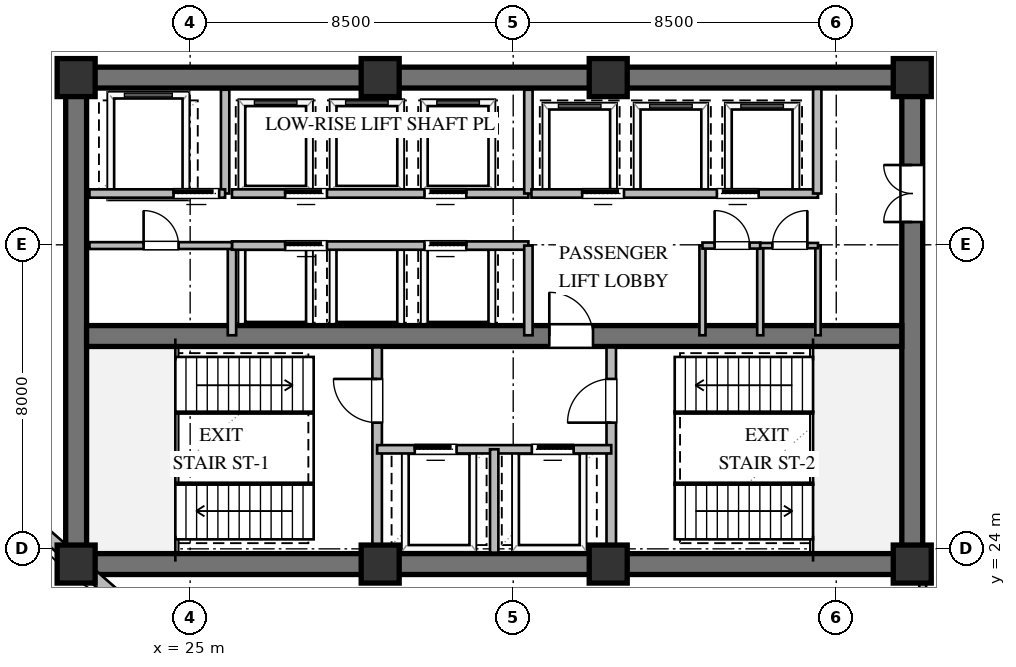
"""IFC4 building model, lengths in metres.
Left out: names, types, materials, properties, quantities, classifications, styles, units other than length and angle.
Written with IfcOpenShell. Run it as: python <this file> out.ifc"""

import sys

from ifc_helpers import new_model, si_unit, direction, frame, frame_2d, origin, origin_2d, place, context, subcontext, project, spatial, rectangle, extrude, element, fill, save


model = new_model("IFC4")
c1 = context("Model", 3, precision=1e-05, world=origin(), true_north=direction((0.0, 1.0)))
c2 = subcontext(c1, "Body", "Model", "MODEL_VIEW")
j1 = project(units=[si_unit("LENGTHUNIT", "METRE"), si_unit("PLANEANGLEUNIT", "RADIAN")], contexts=[c1])
p1 = place(None, origin())
s1 = spatial("IfcSite", under=j1, at=p1, CompositionType="ELEMENT")
p2 = place(p1, origin())
s2 = spatial("IfcBuilding", under=s1, at=p2, CompositionType="ELEMENT")
p3 = place(p2, frame((0.0, 0.0, 97.8)))
s3 = spatial("IfcBuildingStorey", under=s2, at=p3, CompositionType="ELEMENT", Elevation=97.8)
for number, where, z_axis, x_axis in (
    (1, (21.725, 23.6, 0.0), (0.0, 0.0, 1.0), (1.0, 0.0, 0.0)),
    (2, (21.725, 36.4, 0.0), (0.0, 0.0, 1.0), (1.0, 0.0, 0.0)),
):
    element("IfcWall", number, at=place(p3, frame(where, z_axis=z_axis, x_axis=x_axis)), inside=s3, PredefinedType="SHEAR", context=c2, shape_type="SweptSolid", body=[
        extrude(rectangle(XDim=22.55, YDim=0.55, at=frame_2d((11.275, 0.0))), origin(), (0.0, 0.0, 1.0), 4.56),
    ])
p4 = place(p3, frame((22.0, 23.875, 0.0), z_axis=(0.0, 0.0, 1.0), x_axis=(0.0, 1.0, 0.0)))
e3 = element("IfcWall", 3, at=p4, inside=s3, PredefinedType="SHEAR", context=c2, shape_type="SweptSolid", body=[
    extrude(rectangle(XDim=12.25, YDim=0.55, at=frame_2d((6.125, 0.0))), origin(), (0.0, 0.0, 1.0), 4.56),
])
p5 = place(p3, frame((44.0, 23.875, 0.0), z_axis=(0.0, 0.0, 1.0), x_axis=(0.0, 1.0, 0.0)))
e4 = element("IfcWall", 4, at=p5, inside=s3, PredefinedType="SHEAR", context=c2, shape_type="SweptSolid", body=[
    extrude(rectangle(XDim=12.25, YDim=0.55, at=frame_2d((6.125, 0.0))), origin(), (0.0, 0.0, 1.0), 4.56),
])
p6 = place(p5, frame((8.725, 0.0, 0.0)))
e5 = element("IfcOpeningElement", 5, at=p6, cuts=e4, PredefinedType="OPENING", context=c2, shape_type="SweptSolid", body=[
    extrude(rectangle(XDim=1.5, YDim=2.15, at=frame_2d((0.75, 1.075))), frame((0.0, 0.285, 0.0), z_axis=(0.0, -1.0, 0.0), x_axis=(1.0, 0.0, 0.0)), (0.0, 0.0, 1.0), 0.57),
])
p7 = place(p3, frame((22.275, 29.6, 0.0), z_axis=(0.0, 0.0, 1.0), x_axis=(1.0, 0.0, 0.0)))
e6 = element("IfcWall", 6, at=p7, inside=s3, PredefinedType="SHEAR", context=c2, shape_type="SweptSolid", body=[
    extrude(rectangle(XDim=21.45, YDim=0.55, at=frame_2d((10.725, 0.0))), origin(), (0.0, 0.0, 1.0), 4.56),
])
p8 = place(p7, frame((12.175, 0.0, 0.0)))
e7 = element("IfcOpeningElement", 7, at=p8, cuts=e6, PredefinedType="OPENING", context=c2, shape_type="SweptSolid", body=[
    extrude(rectangle(XDim=1.15, YDim=2.1, at=frame_2d((0.575, 1.05))), frame((0.0, 0.285, 0.0), z_axis=(0.0, -1.0, 0.0), x_axis=(1.0, 0.0, 0.0)), (0.0, 0.0, 1.0), 0.57),
])
for number, where, z_axis, x_axis in (
    (8, (22.0, 23.6, 0.0), (0.0, 0.0, 1.0), (1.0, 0.0, 0.0)),
    (9, (30.0, 23.6, 0.0), (0.0, 0.0, 1.0), (1.0, 0.0, 0.0)),
    (10, (36.0, 23.6, 0.0), (0.0, 0.0, 1.0), (1.0, 0.0, 0.0)),
    (11, (44.0, 23.6, 0.0), (0.0, 0.0, 1.0), (1.0, 0.0, 0.0)),
    (12, (44.0, 36.4, 0.0), (0.0, 0.0, 1.0), (1.0, 0.0, 0.0)),
    (13, (36.0, 36.4, 0.0), (0.0, 0.0, 1.0), (1.0, 0.0, 0.0)),
    (14, (30.0, 36.4, 0.0), (0.0, 0.0, 1.0), (1.0, 0.0, 0.0)),
    (15, (22.0, 36.4, 0.0), (0.0, 0.0, 1.0), (1.0, 0.0, 0.0)),
):
    element("IfcColumn", number, at=place(p3, frame(where, z_axis=z_axis, x_axis=x_axis)), inside=s3, PredefinedType="COLUMN", context=c2, shape_type="SweptSolid", body=[
        extrude(rectangle(XDim=1.0, YDim=1.0, at=origin_2d()), origin(), (0.0, 0.0, 1.0), 4.8),
    ])
p9 = place(p3, frame((24.225, 21.727, 0.0), z_axis=(0.0, 0.0, 1.0), x_axis=(-0.753105964003, 0.657899237713, 0.0)))
e16 = element("IfcWall", 16, at=p9, inside=s3, PredefinedType="STANDARD", context=c2, shape_type="SweptSolid", body=[
    extrude(rectangle(XDim=5.998, YDim=0.32, at=frame_2d((2.999, 0.0))), origin(), (0.0, 0.0, 1.0), 2.35),
])
p10 = place(p3, frame((29.92, 23.9, 0.0), z_axis=(0.0, 0.0, 1.0), x_axis=(0.0, 1.0, 0.0)))
e17 = element("IfcWall", 17, at=p10, inside=s3, PredefinedType="SOLIDWALL", context=c2, shape_type="SweptSolid", body=[
    extrude(rectangle(XDim=5.4, YDim=0.25, at=frame_2d((2.7, 0.0))), origin(), (0.0, 0.0, 1.0), 4.09),
])
p11 = place(p10, frame((3.421, 0.0, 0.0)))
e18 = element("IfcOpeningElement", 18, at=p11, cuts=e17, PredefinedType="OPENING", context=c2, shape_type="SweptSolid", body=[
    extrude(rectangle(XDim=1.15, YDim=2.1, at=frame_2d((0.575, 1.05))), frame((0.0, 0.135, 0.0), z_axis=(0.0, -1.0, 0.0), x_axis=(1.0, 0.0, 0.0)), (0.0, 0.0, 1.0), 0.27),
])
p12 = place(p3, frame((36.08, 23.9, 0.0), z_axis=(0.0, 0.0, 1.0), x_axis=(0.0, 1.0, 0.0)))
e19 = element("IfcWall", 19, at=p12, inside=s3, PredefinedType="SOLIDWALL", context=c2, shape_type="SweptSolid", body=[
    extrude(rectangle(XDim=5.4, YDim=0.25, at=frame_2d((2.7, 0.0))), origin(), (0.0, 0.0, 1.0), 4.56),
])
p13 = place(p12, frame((3.421, 0.0, 0.0)))
e20 = element("IfcOpeningElement", 20, at=p13, cuts=e19, PredefinedType="OPENING", context=c2, shape_type="SweptSolid", body=[
    extrude(rectangle(XDim=1.15, YDim=2.1, at=frame_2d((0.575, 1.05))), frame((0.0, 0.135, 0.0), z_axis=(0.0, -1.0, 0.0), x_axis=(1.0, 0.0, 0.0)), (0.0, 0.0, 1.0), 0.27),
])
p14 = place(p3, frame((29.92, 26.62, 0.0), z_axis=(0.0, 0.0, 1.0), x_axis=(1.0, 0.0, 0.0)))
e21 = element("IfcWall", 21, at=p14, inside=s3, PredefinedType="SOLIDWALL", context=c2, shape_type="SweptSolid", body=[
    extrude(rectangle(XDim=6.16, YDim=0.22, at=frame_2d((3.08, 0.0))), origin(), (0.0, 0.0, 1.0), 4.56),
])
p15 = place(p14, frame((0.99, 0.0, 0.0)))
e22 = element("IfcOpeningElement", 22, at=p15, cuts=e21, PredefinedType="OPENING", context=c2, shape_type="SweptSolid", body=[
    extrude(rectangle(XDim=1.1, YDim=2.1, at=frame_2d((0.55, 1.05))), frame((0.0, 0.12, 0.0), z_axis=(0.0, -1.0, 0.0), x_axis=(1.0, 0.0, 0.0)), (0.0, 0.0, 1.0), 0.24),
])
p16 = place(p14, frame((4.07, 0.0, 0.0)))
e23 = element("IfcOpeningElement", 23, at=p16, cuts=e21, PredefinedType="OPENING", context=c2, shape_type="SweptSolid", body=[
    extrude(rectangle(XDim=1.1, YDim=2.1, at=frame_2d((0.55, 1.05))), frame((0.0, 0.12, 0.0), z_axis=(0.0, -1.0, 0.0), x_axis=(1.0, 0.0, 0.0)), (0.0, 0.0, 1.0), 0.24),
])
p17 = place(p3, frame((33.0, 23.9, 0.0), z_axis=(0.0, 0.0, 1.0), x_axis=(0.0, 1.0, 0.0)))
e24 = element("IfcWall", 24, at=p17, inside=s3, PredefinedType="SOLIDWALL", context=c2, shape_type="SweptSolid", body=[
    extrude(rectangle(XDim=2.72, YDim=0.22, at=frame_2d((1.36, 0.0))), origin(), (0.0, 0.0, 1.0), 4.56),
])
p18 = place(p3, frame((25.92, 33.35, 0.0), z_axis=(0.0, 0.0, 1.0), x_axis=(0.0, 1.0, 0.0)))
e25 = element("IfcWall", 25, at=p18, inside=s3, PredefinedType="SOLIDWALL", context=c2, shape_type="SweptSolid", body=[
    extrude(rectangle(XDim=2.73, YDim=0.22, at=frame_2d((1.365, 0.0))), origin(), (0.0, 0.0, 1.0), 4.56),
])
p19 = place(p3, frame((22.35, 33.35, 0.0), z_axis=(0.0, 0.0, 1.0), x_axis=(1.0, 0.0, 0.0)))
e26 = element("IfcWall", 26, at=p19, inside=s3, PredefinedType="SOLIDWALL", context=c2, shape_type="SweptSolid", body=[
    extrude(rectangle(XDim=3.57, YDim=0.22, at=frame_2d((1.785, 0.0))), origin(), (0.0, 0.0, 1.0), 4.56),
])
p20 = place(p19, frame((2.213, 0.0, 0.0)))
e27 = element("IfcOpeningElement", 27, at=p20, cuts=e26, PredefinedType="OPENING", context=c2, shape_type="SweptSolid", body=[
    extrude(rectangle(XDim=1.2, YDim=2.1, at=frame_2d((0.6, 1.05))), frame((0.0, 0.12, 0.0), z_axis=(0.0, -1.0, 0.0), x_axis=(1.0, 0.0, 0.0)), (0.0, 0.0, 1.0), 0.24),
])
p21 = place(p3, frame((26.1, 29.62, 0.0), z_axis=(0.0, 0.0, 1.0), x_axis=(0.0, 1.0, 0.0)))
e28 = element("IfcWall", 28, at=p21, inside=s3, PredefinedType="SOLIDWALL", context=c2, shape_type="SweptSolid", body=[
    extrude(rectangle(XDim=2.36, YDim=0.22, at=frame_2d((1.18, 0.0))), origin(), (0.0, 0.0, 1.0), 4.56),
])
p22 = place(p3, frame((26.1, 31.98, 0.0), z_axis=(0.0, 0.0, 1.0), x_axis=(1.0, 0.0, 0.0)))
e29 = element("IfcWall", 29, at=p22, inside=s3, PredefinedType="SOLIDWALL", context=c2, shape_type="SweptSolid", body=[
    extrude(rectangle(XDim=7.8, YDim=0.22, at=frame_2d((3.9, 0.0))), origin(), (0.0, 0.0, 1.0), 4.56),
])
p23 = place(p22, frame((1.4, 0.0, 0.0)))
e30 = element("IfcOpeningElement", 30, at=p23, cuts=e29, PredefinedType="OPENING", context=c2, shape_type="SweptSolid", body=[
    extrude(rectangle(XDim=1.1, YDim=2.1, at=frame_2d((0.55, 1.05))), frame((0.0, 0.12, 0.0), z_axis=(0.0, -1.0, 0.0), x_axis=(1.0, 0.0, 0.0)), (0.0, 0.0, 1.0), 0.24),
])
p24 = place(p22, frame((5.066, 0.0, 0.0)))
e31 = element("IfcOpeningElement", 31, at=p24, cuts=e29, PredefinedType="OPENING", context=c2, shape_type="SweptSolid", body=[
    extrude(rectangle(XDim=1.1, YDim=2.1, at=frame_2d((0.55, 1.05))), frame((0.0, 0.12, 0.0), z_axis=(0.0, -1.0, 0.0), x_axis=(1.0, 0.0, 0.0)), (0.0, 0.0, 1.0), 0.24),
])
p25 = place(p3, frame((33.9, 29.62, 0.0), z_axis=(0.0, 0.0, 1.0), x_axis=(0.0, 1.0, 0.0)))
e32 = element("IfcWall", 32, at=p25, inside=s3, PredefinedType="SOLIDWALL", context=c2, shape_type="SweptSolid", body=[
    extrude(rectangle(XDim=2.36, YDim=0.22, at=frame_2d((1.18, 0.0))), origin(), (0.0, 0.0, 1.0), 4.56),
])
p26 = place(p3, frame((26.1, 33.35, 0.0), z_axis=(0.0, 0.0, 1.0), x_axis=(1.0, 0.0, 0.0)))
e33 = element("IfcWall", 33, at=p26, inside=s3, PredefinedType="SOLIDWALL", context=c2, shape_type="SweptSolid", body=[
    extrude(rectangle(XDim=7.8, YDim=0.22, at=frame_2d((3.9, 0.0))), origin(), (0.0, 0.0, 1.0), 4.56),
])
p27 = place(p26, frame((1.4, 0.0, 0.0)))
e34 = element("IfcOpeningElement", 34, at=p27, cuts=e33, PredefinedType="OPENING", context=c2, shape_type="SweptSolid", body=[
    extrude(rectangle(XDim=1.1, YDim=2.1, at=frame_2d((0.55, 1.05))), frame((0.0, 0.12, 0.0), z_axis=(0.0, -1.0, 0.0), x_axis=(1.0, 0.0, 0.0)), (0.0, 0.0, 1.0), 0.24),
])
p28 = place(p26, frame((5.066, 0.0, 0.0)))
e35 = element("IfcOpeningElement", 35, at=p28, cuts=e33, PredefinedType="OPENING", context=c2, shape_type="SweptSolid", body=[
    extrude(rectangle(XDim=1.1, YDim=2.1, at=frame_2d((0.55, 1.05))), frame((0.0, 0.12, 0.0), z_axis=(0.0, -1.0, 0.0), x_axis=(1.0, 0.0, 0.0)), (0.0, 0.0, 1.0), 0.24),
])
p29 = place(p3, frame((33.9, 33.35, 0.0), z_axis=(0.0, 0.0, 1.0), x_axis=(0.0, 1.0, 0.0)))
e36 = element("IfcWall", 36, at=p29, inside=s3, PredefinedType="SOLIDWALL", context=c2, shape_type="SweptSolid", body=[
    extrude(rectangle(XDim=2.73, YDim=0.22, at=frame_2d((1.365, 0.0))), origin(), (0.0, 0.0, 1.0), 4.56),
])
p30 = place(p3, frame((33.98, 33.35, 0.0), z_axis=(0.0, 0.0, 1.0), x_axis=(1.0, 0.0, 0.0)))
e37 = element("IfcWall", 37, at=p30, inside=s3, PredefinedType="SOLIDWALL", context=c2, shape_type="SweptSolid", body=[
    extrude(rectangle(XDim=7.54, YDim=0.22, at=frame_2d((3.77, 0.0))), origin(), (0.0, 0.0, 1.0), 4.56),
])
p31 = place(p30, frame((1.335, 0.0, 0.0)))
e38 = element("IfcOpeningElement", 38, at=p31, cuts=e37, PredefinedType="OPENING", context=c2, shape_type="SweptSolid", body=[
    extrude(rectangle(XDim=1.1, YDim=2.1, at=frame_2d((0.55, 1.05))), frame((0.0, 0.12, 0.0), z_axis=(0.0, -1.0, 0.0), x_axis=(1.0, 0.0, 0.0)), (0.0, 0.0, 1.0), 0.24),
])
p32 = place(p30, frame((4.879, 0.0, 0.0)))
e39 = element("IfcOpeningElement", 39, at=p32, cuts=e37, PredefinedType="OPENING", context=c2, shape_type="SweptSolid", body=[
    extrude(rectangle(XDim=1.1, YDim=2.1, at=frame_2d((0.55, 1.05))), frame((0.0, 0.12, 0.0), z_axis=(0.0, -1.0, 0.0), x_axis=(1.0, 0.0, 0.0)), (0.0, 0.0, 1.0), 0.24),
])
p33 = place(p3, frame((41.5, 33.35, 0.0), z_axis=(0.0, 0.0, 1.0), x_axis=(0.0, 1.0, 0.0)))
e40 = element("IfcWall", 40, at=p33, inside=s3, PredefinedType="SOLIDWALL", context=c2, shape_type="SweptSolid", body=[
    extrude(rectangle(XDim=2.75, YDim=0.22, at=frame_2d((1.375, 0.0))), origin(), (0.0, 0.0, 1.0), 4.56),
])
p34 = place(p3, frame((22.35, 31.98, 0.0), z_axis=(0.0, 0.0, 1.0), x_axis=(1.0, 0.0, 0.0)))
e41 = element("IfcWall", 41, at=p34, inside=s3, PredefinedType="PARTITIONING", context=c2, shape_type="SweptSolid", body=[
    extrude(rectangle(XDim=3.75, YDim=0.18, at=frame_2d((1.875, 0.0))), origin(), (0.0, 0.0, 1.0), 4.56),
])
p35 = place(p34, frame((1.425, 0.0, 0.0)))
e42 = element("IfcOpeningElement", 42, at=p35, cuts=e41, PredefinedType="OPENING", context=c2, shape_type="SweptSolid", body=[
    extrude(rectangle(XDim=0.92, YDim=2.1, at=frame_2d((0.46, 1.05))), frame((0.0, 0.1, 0.0), z_axis=(0.0, -1.0, 0.0), x_axis=(1.0, 0.0, 0.0)), (0.0, 0.0, 1.0), 0.2),
])
for number, where, z_axis, x_axis in (
    (43, (38.48, 29.62, 0.0), (0.0, 0.0, 1.0), (0.0, 1.0, 0.0)),
    (44, (40.0, 29.62, 0.0), (0.0, 0.0, 1.0), (0.0, 1.0, 0.0)),
):
    element("IfcWall", number, at=place(p3, frame(where, z_axis=z_axis, x_axis=x_axis)), inside=s3, PredefinedType="PLUMBINGWALL", context=c2, shape_type="SweptSolid", body=[
        extrude(rectangle(XDim=2.36, YDim=0.16, at=frame_2d((1.18, 0.0))), origin(), (0.0, 0.0, 1.0), 4.56),
    ])
p36 = place(p3, frame((41.52, 29.62, 0.0), z_axis=(0.0, 0.0, 1.0), x_axis=(0.0, 1.0, 0.0)))
e45 = element("IfcWall", 45, at=p36, inside=s3, PredefinedType="PARTITIONING", context=c2, shape_type="SweptSolid", body=[
    extrude(rectangle(XDim=2.36, YDim=0.14, at=frame_2d((1.18, 0.0))), origin(), (0.0, 0.0, 1.0), 1.887),
])
p37 = place(p3, frame((38.48, 31.98, 0.0), z_axis=(0.0, 0.0, 1.0), x_axis=(1.0, 0.0, 0.0)))
e46 = element("IfcWall", 46, at=p37, inside=s3, PredefinedType="PLUMBINGWALL", context=c2, shape_type="SweptSolid", body=[
    extrude(rectangle(XDim=1.52, YDim=0.16, at=frame_2d((0.76, 0.0))), origin(), (0.0, 0.0, 1.0), 4.56),
])
p38 = place(p37, frame((0.32, 0.0, 0.0)))
e47 = element("IfcOpeningElement", 47, at=p38, cuts=e46, PredefinedType="OPENING", context=c2, shape_type="SweptSolid", body=[
    extrude(rectangle(XDim=0.92, YDim=2.1, at=frame_2d((0.46, 1.05))), frame((0.0, 0.09, 0.0), z_axis=(0.0, -1.0, 0.0), x_axis=(1.0, 0.0, 0.0)), (0.0, 0.0, 1.0), 0.18),
])
p39 = place(p3, frame((40.0, 31.98, 0.0), z_axis=(0.0, 0.0, 1.0), x_axis=(1.0, 0.0, 0.0)))
e48 = element("IfcWall", 48, at=p39, inside=s3, PredefinedType="PARTITIONING", context=c2, shape_type="SweptSolid", body=[
    extrude(rectangle(XDim=1.52, YDim=0.14, at=frame_2d((0.76, 0.0))), origin(), (0.0, 0.0, 1.0), 4.56),
])
p40 = place(p39, frame((0.32, 0.0, 0.0)))
e49 = element("IfcOpeningElement", 49, at=p40, cuts=e48, PredefinedType="OPENING", context=c2, shape_type="SweptSolid", body=[
    extrude(rectangle(XDim=0.92, YDim=2.1, at=frame_2d((0.46, 1.05))), frame((0.0, 0.08, 0.0), z_axis=(0.0, -1.0, 0.0), x_axis=(1.0, 0.0, 0.0)), (0.0, 0.0, 1.0), 0.16),
])
p41 = place(p3, frame((44.275, 21.47, 0.0), z_axis=(0.0, 0.0, 1.0), x_axis=(0.0, 1.0, 0.0)))
e50 = element("IfcWall", 50, at=p41, inside=s3, PredefinedType="PARTITIONING", context=c2, shape_type="SweptSolid", body=[
    extrude(rectangle(XDim=2.12, YDim=0.18, at=frame_2d((1.06, 0.0))), origin(), (0.0, 0.0, 1.0), 3.7),
])
p42 = place(p11, origin())
e51 = element("IfcDoor", 51, at=p42, inside=s3, OperationType="SINGLE_SWING_RIGHT", PredefinedType="DOOR", context=c2, shape_type="SweptSolid", body=[
    extrude(rectangle(XDim=1.15, YDim=2.1, at=frame_2d((0.575, 1.05))), frame((0.0, 0.025, 0.0), z_axis=(0.0, -1.0, 0.0), x_axis=(1.0, 0.0, 0.0)), (0.0, 0.0, 1.0), 0.05),
])
fill(e18, e51)
p43 = place(p13, origin())
e52 = element("IfcDoor", 52, at=p43, inside=s3, OperationType="SINGLE_SWING_LEFT", PredefinedType="DOOR", context=c2, shape_type="SweptSolid", body=[
    extrude(rectangle(XDim=1.15, YDim=2.1, at=frame_2d((0.575, 1.05))), frame((0.0, 0.025, 0.0), z_axis=(0.0, -1.0, 0.0), x_axis=(1.0, 0.0, 0.0)), (0.0, 0.0, 1.0), 0.05),
])
fill(e20, e52)
p44 = place(p15, origin())
e53 = element("IfcDoor", 53, at=p44, inside=s3, OperationType="SLIDING_TO_LEFT", PredefinedType="DOOR", context=c2, shape_type="SweptSolid", body=[
    extrude(rectangle(XDim=1.1, YDim=2.1, at=frame_2d((0.55, 1.05))), frame((0.0, 0.025, 0.0), z_axis=(0.0, -1.0, 0.0), x_axis=(1.0, 0.0, 0.0)), (0.0, 0.0, 1.0), 0.05),
])
fill(e22, e53)
p45 = place(p16, origin())
e54 = element("IfcDoor", 54, at=p45, inside=s3, OperationType="SLIDING_TO_RIGHT", PredefinedType="DOOR", context=c2, shape_type="SweptSolid", body=[
    extrude(rectangle(XDim=1.1, YDim=2.1, at=frame_2d((0.55, 1.05))), frame((0.0, 0.025, 0.0), z_axis=(0.0, -1.0, 0.0), x_axis=(1.0, 0.0, 0.0)), (0.0, 0.0, 1.0), 0.05),
])
fill(e23, e54)
p46 = place(p8, origin())
e55 = element("IfcDoor", 55, at=p46, inside=s3, OperationType="SINGLE_SWING_LEFT", PredefinedType="DOOR", context=c2, shape_type="SweptSolid", body=[
    extrude(rectangle(XDim=1.15, YDim=2.1, at=frame_2d((0.575, 1.05))), frame((0.0, 0.025, 0.0), z_axis=(0.0, -1.0, 0.0), x_axis=(1.0, 0.0, 0.0)), (0.0, 0.0, 1.0), 0.05),
])
fill(e7, e55)
p47 = place(p6, origin())
e56 = element("IfcDoor", 56, at=p47, inside=s3, OperationType="DOUBLE_DOOR_SINGLE_SWING", PredefinedType="DOOR", context=c2, shape_type="SweptSolid", body=[
    extrude(rectangle(XDim=1.5, YDim=2.15, at=frame_2d((0.75, 1.075))), frame((0.0, 0.025, 0.0), z_axis=(0.0, -1.0, 0.0), x_axis=(1.0, 0.0, 0.0)), (0.0, 0.0, 1.0), 0.05),
])
fill(e5, e56)
p48 = place(p20, origin())
e57 = element("IfcDoor", 57, at=p48, inside=s3, OperationType="SLIDING_TO_LEFT", PredefinedType="DOOR", context=c2, shape_type="SweptSolid", body=[
    extrude(rectangle(XDim=1.2, YDim=2.1, at=frame_2d((0.6, 1.05))), frame((0.0, 0.025, 0.0), z_axis=(0.0, -1.0, 0.0), x_axis=(1.0, 0.0, 0.0)), (0.0, 0.0, 1.0), 0.05),
])
fill(e27, e57)
p49 = place(p23, origin())
e58 = element("IfcDoor", 58, at=p49, inside=s3, OperationType="SLIDING_TO_LEFT", PredefinedType="DOOR", context=c2, shape_type="SweptSolid", body=[
    extrude(rectangle(XDim=1.1, YDim=2.1, at=frame_2d((0.55, 1.05))), frame((0.0, 0.025, 0.0), z_axis=(0.0, -1.0, 0.0), x_axis=(1.0, 0.0, 0.0)), (0.0, 0.0, 1.0), 0.05),
])
fill(e30, e58)
p50 = place(p24, origin())
e59 = element("IfcDoor", 59, at=p50, inside=s3, OperationType="SLIDING_TO_RIGHT", PredefinedType="DOOR", context=c2, shape_type="SweptSolid", body=[
    extrude(rectangle(XDim=1.1, YDim=2.1, at=frame_2d((0.55, 1.05))), frame((0.0, 0.025, 0.0), z_axis=(0.0, -1.0, 0.0), x_axis=(1.0, 0.0, 0.0)), (0.0, 0.0, 1.0), 0.05),
])
fill(e31, e59)
p51 = place(p27, origin())
e60 = element("IfcDoor", 60, at=p51, inside=s3, OperationType="SLIDING_TO_LEFT", PredefinedType="DOOR", context=c2, shape_type="SweptSolid", body=[
    extrude(rectangle(XDim=1.1, YDim=2.1, at=frame_2d((0.55, 1.05))), frame((0.0, 0.025, 0.0), z_axis=(0.0, -1.0, 0.0), x_axis=(1.0, 0.0, 0.0)), (0.0, 0.0, 1.0), 0.05),
])
fill(e34, e60)
p52 = place(p28, origin())
e61 = element("IfcDoor", 61, at=p52, inside=s3, OperationType="SLIDING_TO_RIGHT", PredefinedType="DOOR", context=c2, shape_type="SweptSolid", body=[
    extrude(rectangle(XDim=1.1, YDim=2.1, at=frame_2d((0.55, 1.05))), frame((0.0, 0.025, 0.0), z_axis=(0.0, -1.0, 0.0), x_axis=(1.0, 0.0, 0.0)), (0.0, 0.0, 1.0), 0.05),
])
fill(e35, e61)
p53 = place(p31, origin())
e62 = element("IfcDoor", 62, at=p53, inside=s3, OperationType="SLIDING_TO_LEFT", PredefinedType="DOOR", context=c2, shape_type="SweptSolid", body=[
    extrude(rectangle(XDim=1.1, YDim=2.1, at=frame_2d((0.55, 1.05))), frame((0.0, 0.025, 0.0), z_axis=(0.0, -1.0, 0.0), x_axis=(1.0, 0.0, 0.0)), (0.0, 0.0, 1.0), 0.05),
])
fill(e38, e62)
p54 = place(p32, origin())
e63 = element("IfcDoor", 63, at=p54, inside=s3, OperationType="SLIDING_TO_RIGHT", PredefinedType="DOOR", context=c2, shape_type="SweptSolid", body=[
    extrude(rectangle(XDim=1.1, YDim=2.1, at=frame_2d((0.55, 1.05))), frame((0.0, 0.025, 0.0), z_axis=(0.0, -1.0, 0.0), x_axis=(1.0, 0.0, 0.0)), (0.0, 0.0, 1.0), 0.05),
])
fill(e39, e63)
p55 = place(p35, origin())
e64 = element("IfcDoor", 64, at=p55, inside=s3, OperationType="SINGLE_SWING_LEFT", PredefinedType="DOOR", context=c2, shape_type="SweptSolid", body=[
    extrude(rectangle(XDim=0.92, YDim=2.1, at=frame_2d((0.46, 1.05))), frame((0.0, 0.025, 0.0), z_axis=(0.0, -1.0, 0.0), x_axis=(1.0, 0.0, 0.0)), (0.0, 0.0, 1.0), 0.05),
])
fill(e42, e64)
p56 = place(p38, origin())
e65 = element("IfcDoor", 65, at=p56, inside=s3, OperationType="SINGLE_SWING_LEFT", PredefinedType="DOOR", context=c2, shape_type="SweptSolid", body=[
    extrude(rectangle(XDim=0.92, YDim=2.1, at=frame_2d((0.46, 1.05))), frame((0.0, 0.025, 0.0), z_axis=(0.0, -1.0, 0.0), x_axis=(1.0, 0.0, 0.0)), (0.0, 0.0, 1.0), 0.05),
])
fill(e47, e65)
p57 = place(p40, origin())
e66 = element("IfcDoor", 66, at=p57, inside=s3, OperationType="SINGLE_SWING_RIGHT", PredefinedType="DOOR", context=c2, shape_type="SweptSolid", body=[
    extrude(rectangle(XDim=0.92, YDim=2.1, at=frame_2d((0.46, 1.05))), frame((0.0, 0.025, 0.0), z_axis=(0.0, -1.0, 0.0), x_axis=(1.0, 0.0, 0.0)), (0.0, 0.0, 1.0), 0.05),
])
fill(e49, e66)
save(model, sys.argv[1])
